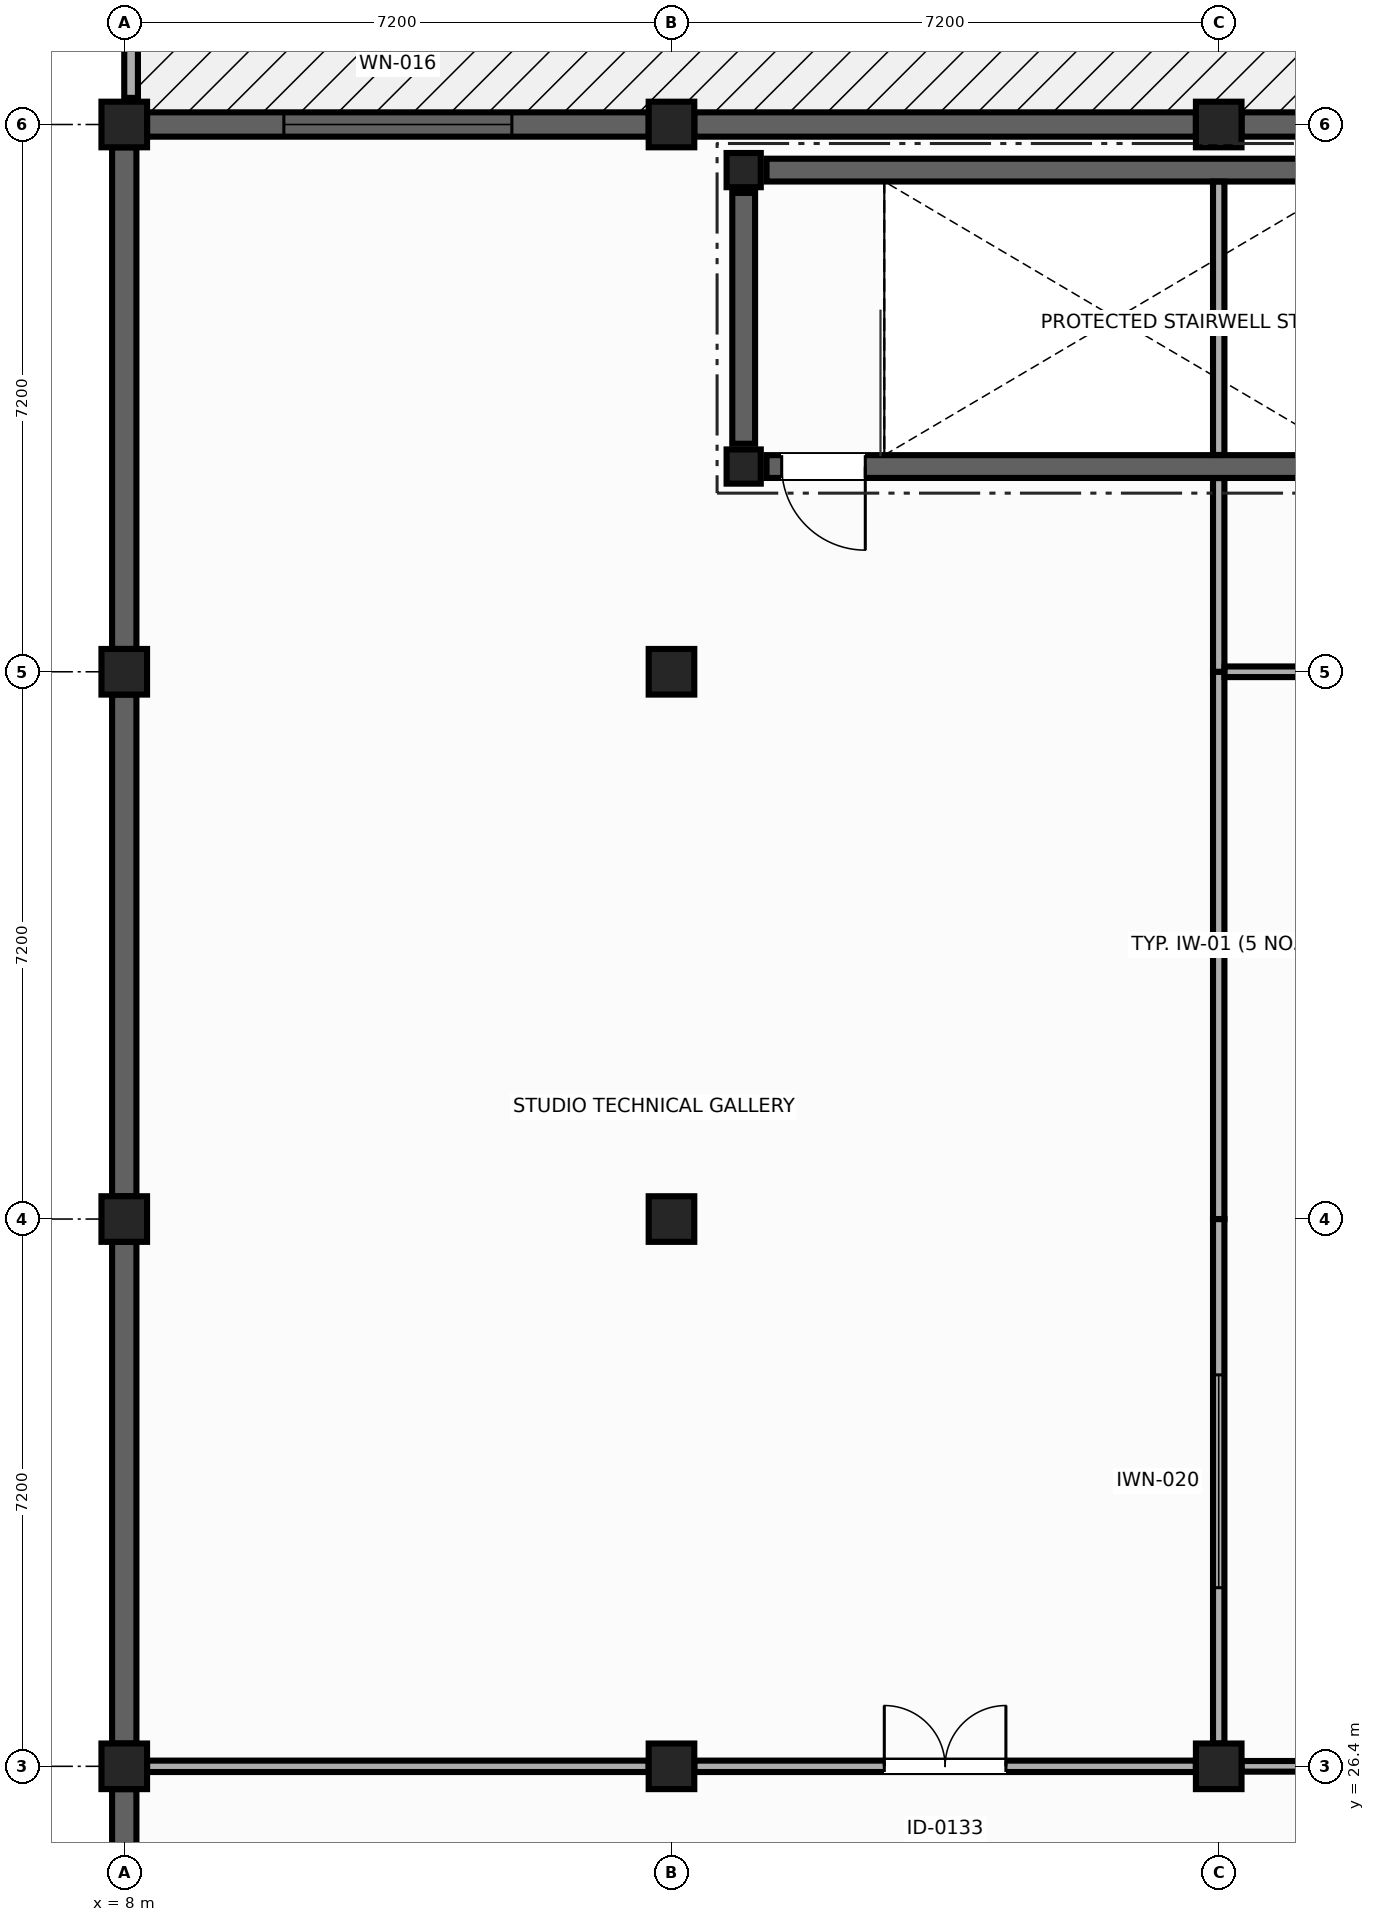
"""IFC4 building model, lengths in metres.
Left out: names, types, materials, properties, quantities, classifications, styles, units other than length and angle.
Written with IfcOpenShell. Run it as: python <this file> out.ifc"""

import sys

from ifc_helpers import new_model, si_unit, direction, frame, frame_2d, origin, origin_2d, place, context, subcontext, project, spatial, rectangle, extrude, element, fill, save


model = new_model("IFC4")
c1 = context("Model", 3, precision=1e-05, world=origin(), true_north=direction((0.0, 1.0)))
c2 = subcontext(c1, "Body", "Model", "MODEL_VIEW")
j1 = project(units=[si_unit("LENGTHUNIT", "METRE"), si_unit("PLANEANGLEUNIT", "RADIAN")], contexts=[c1])
p1 = place(None, origin())
s1 = spatial("IfcSite", under=j1, at=p1, CompositionType="ELEMENT")
p2 = place(p1, origin())
s2 = spatial("IfcBuilding", under=s1, at=p2, CompositionType="ELEMENT")
p3 = place(p2, frame((0.0, 0.0, 9.9)))
s3 = spatial("IfcBuildingStorey", under=s2, at=p3, CompositionType="ELEMENT", Elevation=9.9)
p4 = place(p3, frame((8.0, 26.4, 0.0), z_axis=(0.0, 0.0, 1.0), x_axis=(1.0, 0.0, 0.0)))
e1 = element("IfcColumn", 1, at=p4, inside=s3, PredefinedType="COLUMN", context=c2, shape_type="SweptSolid", body=[
    extrude(rectangle(XDim=0.6, YDim=0.6, at=origin_2d()), origin(), (0.0, 0.0, 1.0), 4.313),
])
p5 = place(p3, frame((15.2, 26.4, 0.0), z_axis=(0.0, 0.0, 1.0), x_axis=(0.0, 1.0, 0.0)))
e2 = element("IfcColumn", 2, at=p5, inside=s3, PredefinedType="COLUMN", context=c2, shape_type="SweptSolid", body=[
    extrude(rectangle(XDim=0.6, YDim=0.6, at=origin_2d()), origin(), (0.0, 0.0, 1.0), 6.213),
])
p6 = place(p3, frame((22.4, 26.4, 0.0), z_axis=(0.0, 0.0, 1.0), x_axis=(1.0, 0.0, 0.0)))
e3 = element("IfcColumn", 3, at=p6, inside=s3, PredefinedType="COLUMN", context=c2, shape_type="SweptSolid", body=[
    extrude(rectangle(XDim=0.6, YDim=0.6, at=origin_2d()), origin(), (0.0, 0.0, 1.0), 8.113),
])
p7 = place(p3, frame((8.0, 33.6, 0.0), z_axis=(0.0, 0.0, 1.0), x_axis=(0.0, 1.0, 0.0)))
e4 = element("IfcColumn", 4, at=p7, inside=s3, PredefinedType="COLUMN", context=c2, shape_type="SweptSolid", body=[
    extrude(rectangle(XDim=0.6, YDim=0.6, at=origin_2d()), origin(), (0.0, 0.0, 1.0), 4.313),
])
p8 = place(p3, frame((15.2, 33.6, 0.0), z_axis=(0.0, 0.0, 1.0), x_axis=(1.0, 0.0, 0.0)))
e5 = element("IfcColumn", 5, at=p8, inside=s3, PredefinedType="COLUMN", context=c2, shape_type="SweptSolid", body=[
    extrude(rectangle(XDim=0.6, YDim=0.6, at=origin_2d()), origin(), (0.0, 0.0, 1.0), 6.213),
])
p9 = place(p3, frame((8.0, 40.8, 0.0), z_axis=(0.0, 0.0, 1.0), x_axis=(1.0, 0.0, 0.0)))
e6 = element("IfcColumn", 6, at=p9, inside=s3, PredefinedType="COLUMN", context=c2, shape_type="SweptSolid", body=[
    extrude(rectangle(XDim=0.6, YDim=0.6, at=origin_2d()), origin(), (0.0, 0.0, 1.0), 4.313),
])
p10 = place(p3, frame((15.2, 40.8, 0.0), z_axis=(0.0, 0.0, 1.0), x_axis=(1.0, 0.0, 0.0)))
e7 = element("IfcColumn", 7, at=p10, inside=s3, PredefinedType="COLUMN", context=c2, shape_type="SweptSolid", body=[
    extrude(rectangle(XDim=0.6, YDim=0.6, at=origin_2d()), origin(), (0.0, 0.0, 1.0), 6.213),
])
p11 = place(p3, frame((8.0, 48.0, 0.0), z_axis=(0.0, 0.0, 1.0), x_axis=(1.0, 0.0, 0.0)))
e8 = element("IfcColumn", 8, at=p11, inside=s3, PredefinedType="COLUMN", context=c2, shape_type="SweptSolid", body=[
    extrude(rectangle(XDim=0.6, YDim=0.6, at=origin_2d()), origin(), (0.0, 0.0, 1.0), 4.313),
])
p12 = place(p3, frame((15.2, 48.0, 0.0), z_axis=(0.0, 0.0, 1.0), x_axis=(0.0, 1.0, 0.0)))
e9 = element("IfcColumn", 9, at=p12, inside=s3, PredefinedType="COLUMN", context=c2, shape_type="SweptSolid", body=[
    extrude(rectangle(XDim=0.6, YDim=0.6, at=origin_2d()), origin(), (0.0, 0.0, 1.0), 6.213),
])
p13 = place(p3, frame((22.4, 48.0, 0.0), z_axis=(0.0, 0.0, 1.0), x_axis=(1.0, 0.0, 0.0)))
e10 = element("IfcColumn", 10, at=p13, inside=s3, PredefinedType="COLUMN", context=c2, shape_type="SweptSolid", body=[
    extrude(rectangle(XDim=0.6, YDim=0.6, at=origin_2d()), origin(), (0.0, 0.0, 1.0), 8.113),
])
for number, where, z_axis, x_axis in (
    (11, (16.15, 43.5, 0.0), (0.0, 0.0, 1.0), (1.0, 0.0, 0.0)),
    (12, (16.15, 47.4, 0.0), (0.0, 0.0, 1.0), (1.0, 0.0, 0.0)),
):
    element("IfcColumn", number, at=place(p3, frame(where, z_axis=z_axis, x_axis=x_axis)), inside=s3, PredefinedType="COLUMN", context=c2, shape_type="SweptSolid", body=[
        extrude(rectangle(XDim=0.45, YDim=0.45, at=origin_2d()), origin(), (0.0, 0.0, 1.0), 6.464),
    ])
for number, where, z_axis, x_axis in (
    (13, (8.0, 19.5, 0.0), (0.0, 0.0, 1.0), (0.0, 1.0, 0.0)),
    (14, (8.0, 26.7, 0.0), (0.0, 0.0, 1.0), (0.0, 1.0, 0.0)),
    (15, (8.0, 33.9, 0.0), (0.0, 0.0, 1.0), (0.0, 1.0, 0.0)),
):
    element("IfcWall", number, at=place(p3, frame(where, z_axis=z_axis, x_axis=x_axis)), inside=s3, PredefinedType="SOLIDWALL", context=c2, shape_type="SweptSolid", body=[
        extrude(rectangle(XDim=6.6, YDim=0.32, at=frame_2d((3.3, 0.0))), origin(), (0.0, 0.0, 1.0), 4.313),
    ])
p14 = place(p3, frame((8.0, 41.1, 0.0), z_axis=(0.0, 0.0, 1.0), x_axis=(0.0, 1.0, 0.0)))
e16 = element("IfcWall", 16, at=p14, inside=s3, PredefinedType="SOLIDWALL", context=c2, shape_type="SweptSolid", body=[
    extrude(rectangle(XDim=6.6, YDim=0.32, at=frame_2d((3.3, 0.0))), origin(), (0.0, 0.0, 1.0), 4.313),
])
p15 = place(p3, frame((8.3, 48.0, 0.0), z_axis=(0.0, 0.0, 1.0), x_axis=(1.0, 0.0, 0.0)))
e17 = element("IfcWall", 17, at=p15, inside=s3, PredefinedType="SOLIDWALL", context=c2, shape_type="SweptSolid", body=[
    extrude(rectangle(XDim=6.6, YDim=0.32, at=frame_2d((3.3, 0.0))), origin(), (0.0, 0.0, 1.0), 4.5),
])
p16 = place(p15, frame((1.8, 0.0, 1.8)))
e18 = element("IfcOpeningElement", 18, at=p16, cuts=e17, PredefinedType="OPENING", context=c2, shape_type="SweptSolid", body=[
    extrude(rectangle(XDim=3.0, YDim=1.2, at=frame_2d((1.5, 0.6))), frame((0.0, 0.17, 0.0), z_axis=(0.0, -1.0, 0.0), x_axis=(1.0, 0.0, 0.0)), (0.0, 0.0, 1.0), 0.34),
])
for number, where, z_axis, x_axis in (
    (19, (15.5, 48.0, 0.0), (0.0, 0.0, 1.0), (1.0, 0.0, 0.0)),
    (20, (22.7, 48.0, 0.0), (0.0, 0.0, 1.0), (1.0, 0.0, 0.0)),
):
    element("IfcWall", number, at=place(p3, frame(where, z_axis=z_axis, x_axis=x_axis)), inside=s3, PredefinedType="SOLIDWALL", context=c2, shape_type="SweptSolid", body=[
        extrude(rectangle(XDim=6.6, YDim=0.32, at=frame_2d((3.3, 0.0))), origin(), (0.0, 0.0, 1.0), 4.5),
    ])
p17 = place(p3, frame((8.09, 48.35, 0.0), z_axis=(0.0, 0.0, 1.0), x_axis=(0.0, 1.0, 0.0)))
e21 = element("IfcWall", 21, at=p17, inside=s3, PredefinedType="PARAPET", context=c2, shape_type="SweptSolid", body=[
    extrude(rectangle(XDim=13.96, YDim=0.18, at=frame_2d((6.98, 0.0))), origin(), (0.0, 0.0, 1.0), 1.15),
])
p18 = place(p3, frame((23.95, 43.5, 0.0), z_axis=(0.0, 0.0, 1.0), x_axis=(-1.0, 0.0, 0.0)))
e22 = element("IfcWall", 22, at=p18, inside=s3, PredefinedType="SHEAR", context=c2, shape_type="SweptSolid", body=[
    extrude(rectangle(XDim=7.5, YDim=0.3, at=frame_2d((3.75, 0.0))), origin(), (0.0, 0.0, 1.0), 7.532),
])
p19 = place(p18, frame((6.2, 0.0, 0.0)))
e23 = element("IfcOpeningElement", 23, at=p19, cuts=e22, PredefinedType="OPENING", context=c2, shape_type="SweptSolid", body=[
    extrude(rectangle(XDim=1.1, YDim=2.15, at=frame_2d((0.55, 1.075))), frame((0.0, 0.16, 0.0), z_axis=(0.0, -1.0, 0.0), x_axis=(1.0, 0.0, 0.0)), (0.0, 0.0, 1.0), 0.32),
])
p20 = place(p3, frame((16.15, 43.8, 0.0), z_axis=(0.0, 0.0, 1.0), x_axis=(0.0, 1.0, 0.0)))
e24 = element("IfcWall", 24, at=p20, inside=s3, PredefinedType="SHEAR", context=c2, shape_type="SweptSolid", body=[
    extrude(rectangle(XDim=3.3, YDim=0.3, at=frame_2d((1.65, 0.0))), origin(), (0.0, 0.0, 1.0), 6.464),
])
p21 = place(p3, frame((16.45, 47.4, 0.0), z_axis=(0.0, 0.0, 1.0), x_axis=(1.0, 0.0, 0.0)))
e25 = element("IfcWall", 25, at=p21, inside=s3, PredefinedType="SHEAR", context=c2, shape_type="SweptSolid", body=[
    extrude(rectangle(XDim=7.5, YDim=0.3, at=frame_2d((3.75, 0.0))), origin(), (0.0, 0.0, 1.0), 7.532),
])
p22 = place(p3, frame((22.4, 26.7, 0.0), z_axis=(0.0, 0.0, 1.0), x_axis=(0.0, 1.0, 0.0)))
e26 = element("IfcWall", 26, at=p22, inside=s3, PredefinedType="PARTITIONING", context=c2, shape_type="SweptSolid", body=[
    extrude(rectangle(XDim=6.9, YDim=0.15, at=frame_2d((3.45, 0.0))), origin(), (0.0, 0.0, 1.0), 7.551),
])
p23 = place(p22, frame((2.05, 0.0, 1.1)))
e27 = element("IfcOpeningElement", 27, at=p23, cuts=e26, PredefinedType="OPENING", context=c2, shape_type="SweptSolid", body=[
    extrude(rectangle(XDim=2.8, YDim=1.1, at=frame_2d((1.4, 0.55))), frame((0.0, 0.085, 0.0), z_axis=(0.0, -1.0, 0.0), x_axis=(1.0, 0.0, 0.0)), (0.0, 0.0, 1.0), 0.17),
])
p24 = place(p3, frame((22.4, 33.6, 0.0), z_axis=(0.0, 0.0, 1.0), x_axis=(0.0, 1.0, 0.0)))
e28 = element("IfcWall", 28, at=p24, inside=s3, PredefinedType="PARTITIONING", context=c2, shape_type="SweptSolid", body=[
    extrude(rectangle(XDim=7.2, YDim=0.15, at=frame_2d((3.6, 0.0))), origin(), (0.0, 0.0, 1.0), 7.551),
])
p25 = place(p3, frame((22.4, 43.652, 0.0), z_axis=(0.0, 0.0, 1.0), x_axis=(0.0, 1.0, 0.0)))
e29 = element("IfcWall", 29, at=p25, inside=s3, PredefinedType="PARTITIONING", context=c2, shape_type="SweptSolid", body=[
    extrude(rectangle(XDim=3.596, YDim=0.15, at=frame_2d((1.798, 0.0))), origin(), (0.0, 0.0, 1.0), 7.551),
])
p26 = place(p3, frame((22.4, 40.8, 0.0), z_axis=(0.0, 0.0, 1.0), x_axis=(0.0, 1.0, 0.0)))
e30 = element("IfcWall", 30, at=p26, inside=s3, PredefinedType="PARTITIONING", context=c2, shape_type="SweptSolid", body=[
    extrude(rectangle(XDim=2.548, YDim=0.15, at=frame_2d((1.274, 0.0))), origin(), (0.0, 0.0, 1.0), 7.551),
])
p27 = place(p3, frame((8.3, 26.4, 0.0), z_axis=(0.0, 0.0, 1.0), x_axis=(1.0, 0.0, 0.0)))
e31 = element("IfcWall", 31, at=p27, inside=s3, PredefinedType="PARTITIONING", context=c2, shape_type="SweptSolid", body=[
    extrude(rectangle(XDim=6.6, YDim=0.15, at=frame_2d((3.3, 0.0))), origin(), (0.0, 0.0, 1.0), 5.263),
])
p28 = place(p3, frame((15.5, 26.4, 0.0), z_axis=(0.0, 0.0, 1.0), x_axis=(1.0, 0.0, 0.0)))
e32 = element("IfcWall", 32, at=p28, inside=s3, PredefinedType="PARTITIONING", context=c2, shape_type="SweptSolid", body=[
    extrude(rectangle(XDim=6.6, YDim=0.15, at=frame_2d((3.3, 0.0))), origin(), (0.0, 0.0, 1.0), 7.163),
])
p29 = place(p28, frame((2.5, 0.0, 0.0)))
e33 = element("IfcOpeningElement", 33, at=p29, cuts=e32, PredefinedType="OPENING", context=c2, shape_type="SweptSolid", body=[
    extrude(rectangle(XDim=1.6, YDim=2.25, at=frame_2d((0.8, 1.125))), frame((0.0, 0.085, 0.0), z_axis=(0.0, -1.0, 0.0), x_axis=(1.0, 0.0, 0.0)), (0.0, 0.0, 1.0), 0.17),
])
p30 = place(p3, frame((29.6, 40.8, 0.0), z_axis=(0.0, 0.0, 1.0), x_axis=(-1.0, 0.0, 0.0)))
e34 = element("IfcWall", 34, at=p30, inside=s3, PredefinedType="PARTITIONING", context=c2, shape_type="SweptSolid", body=[
    extrude(rectangle(XDim=7.123, YDim=0.14, at=frame_2d((3.562, 0.0))), origin(), (0.0, 0.0, 1.0), 7.153),
])
p31 = place(p3, frame((22.7, 26.4, 0.0), z_axis=(0.0, 0.0, 1.0), x_axis=(1.0, 0.0, 0.0)))
e35 = element("IfcWall", 35, at=p31, inside=s3, PredefinedType="PARTITIONING", context=c2, shape_type="SweptSolid", body=[
    extrude(rectangle(XDim=6.6, YDim=0.14, at=frame_2d((3.3, 0.0))), origin(), (0.0, 0.0, 1.0), 7.163),
])
p32 = place(p31, frame((2.84, 0.0, 0.0)))
e36 = element("IfcOpeningElement", 36, at=p32, cuts=e35, PredefinedType="OPENING", context=c2, shape_type="SweptSolid", body=[
    extrude(rectangle(XDim=0.92, YDim=2.1, at=frame_2d((0.46, 1.05))), frame((0.0, 0.08, 0.0), z_axis=(0.0, -1.0, 0.0), x_axis=(1.0, 0.0, 0.0)), (0.0, 0.0, 1.0), 0.16),
])
p33 = place(p16, origin())
e37 = element("IfcWindow", 37, at=p33, inside=s3, PartitioningType="SINGLE_PANEL", PredefinedType="WINDOW", context=c2, shape_type="SweptSolid", body=[
    extrude(rectangle(XDim=3.0, YDim=1.2, at=frame_2d((1.5, 0.6))), frame((0.0, 0.03, 0.0), z_axis=(0.0, -1.0, 0.0), x_axis=(1.0, 0.0, 0.0)), (0.0, 0.0, 1.0), 0.06),
])
fill(e18, e37)
p34 = place(p19, origin())
e38 = element("IfcDoor", 38, at=p34, inside=s3, OperationType="SINGLE_SWING_LEFT", PredefinedType="DOOR", context=c2, shape_type="SweptSolid", body=[
    extrude(rectangle(XDim=1.1, YDim=2.15, at=frame_2d((0.55, 1.075))), frame((0.0, 0.025, 0.0), z_axis=(0.0, -1.0, 0.0), x_axis=(1.0, 0.0, 0.0)), (0.0, 0.0, 1.0), 0.05),
])
fill(e23, e38)
p35 = place(p29, origin())
e39 = element("IfcDoor", 39, at=p35, inside=s3, OperationType="DOUBLE_DOOR_SINGLE_SWING", PredefinedType="DOOR", context=c2, shape_type="SweptSolid", body=[
    extrude(rectangle(XDim=1.6, YDim=2.25, at=frame_2d((0.8, 1.125))), frame((0.0, 0.025, 0.0), z_axis=(0.0, -1.0, 0.0), x_axis=(1.0, 0.0, 0.0)), (0.0, 0.0, 1.0), 0.05),
])
fill(e33, e39)
p36 = place(p23, origin())
e40 = element("IfcWindow", 40, at=p36, inside=s3, PartitioningType="SINGLE_PANEL", PredefinedType="WINDOW", context=c2, shape_type="SweptSolid", body=[
    extrude(rectangle(XDim=2.8, YDim=1.1, at=frame_2d((1.4, 0.55))), frame((0.0, 0.03, 0.0), z_axis=(0.0, -1.0, 0.0), x_axis=(1.0, 0.0, 0.0)), (0.0, 0.0, 1.0), 0.06),
])
fill(e27, e40)
save(model, sys.argv[1])
